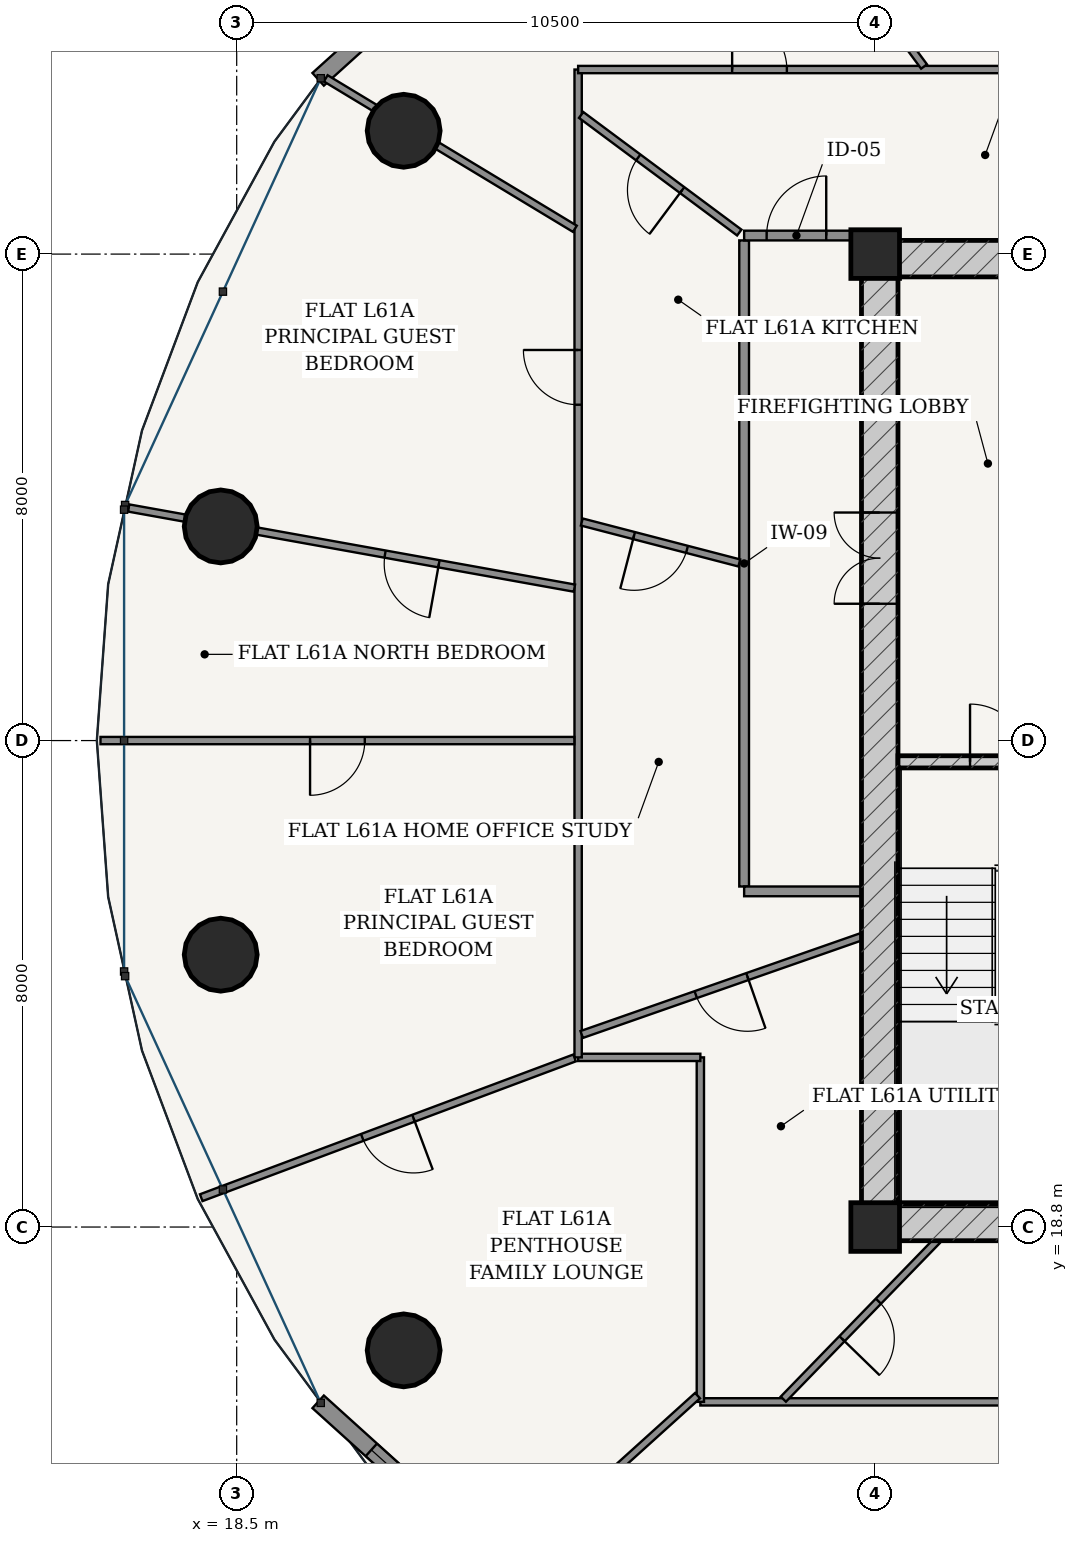
"""IFC4 building model, lengths in metres.
Left out: names, types, materials, properties, quantities, classifications, styles, units other than length and angle.
Written with IfcOpenShell. Run it as: python <this file> out.ifc"""

import sys

from ifc_helpers import new_model, si_unit, direction, frame, frame_2d, origin, origin_2d, place, context, subcontext, project, spatial, rectangle, hollow_circle, extrude, source, transform, mapped, element, fill, save


model = new_model("IFC4")
c1 = context("Model", 3, precision=1e-05, world=origin(), true_north=direction((-0.2419218956, 0.970295726276)))
c2 = subcontext(c1, "Body", "Model", "MODEL_VIEW")
j1 = project(units=[si_unit("LENGTHUNIT", "METRE"), si_unit("PLANEANGLEUNIT", "RADIAN")], contexts=[c1])
p1 = place(None, origin())
s1 = spatial("IfcSite", under=j1, at=p1, CompositionType="ELEMENT")
p2 = place(p1, origin())
s2 = spatial("IfcBuilding", under=s1, at=p2, CompositionType="ELEMENT")
p3 = place(p2, frame((0.0, 0.0, 231.9)))
s3 = spatial("IfcBuildingStorey", under=s2, at=p3, CompositionType="ELEMENT", Elevation=231.9)
for number, where, z_axis, x_axis in (
    (1, (29.0, 18.8, 0.0), (0.0, 0.0, 1.0), (1.0, 0.0, 0.0)),
    (2, (29.0, 34.8, 0.0), (0.0, 0.0, 1.0), (1.0, 0.0, 0.0)),
):
    element("IfcColumn", number, at=place(p3, frame(where, z_axis=z_axis, x_axis=x_axis)), inside=s3, PredefinedType="COLUMN", context=c2, shape_type="SweptSolid", body=[
        extrude(rectangle(XDim=0.8, YDim=0.8, at=origin_2d()), origin(), (0.0, 0.0, 1.0), 3.7),
    ])
p4 = place(p3, frame((28.775, 18.875, 0.0), z_axis=(0.0, 0.0, 1.0), x_axis=(1.0, 0.0, 0.0)))
e3 = element("IfcWall", 3, at=p4, inside=s3, PredefinedType="SHEAR", context=c2, shape_type="SweptSolid", body=[
    extrude(rectangle(XDim=18.45, YDim=0.6, at=frame_2d((9.225, 0.0))), origin(), (0.0, 0.0, 1.0), 3.435),
])
p5 = place(p4, frame((8.8, 0.0, 0.0)))
e4 = element("IfcOpeningElement", 4, at=p5, cuts=e3, PredefinedType="OPENING", context=c2, shape_type="SweptSolid", body=[
    extrude(rectangle(XDim=0.85, YDim=2.1, at=frame_2d((0.425, 1.05))), frame((0.0, 0.31, 0.0), z_axis=(0.0, -1.0, 0.0), x_axis=(1.0, 0.0, 0.0)), (0.0, 0.0, 1.0), 0.62),
])
p6 = place(p3, frame((28.775, 34.725, 0.0), z_axis=(0.0, 0.0, 1.0), x_axis=(1.0, 0.0, 0.0)))
e5 = element("IfcWall", 5, at=p6, inside=s3, PredefinedType="SHEAR", context=c2, shape_type="SweptSolid", body=[
    extrude(rectangle(XDim=18.45, YDim=0.6, at=frame_2d((9.225, 0.0))), origin(), (0.0, 0.0, 1.0), 3.435),
])
p7 = place(p3, frame((29.075, 19.175, 0.0), z_axis=(0.0, 0.0, 1.0), x_axis=(0.0, 1.0, 0.0)))
e6 = element("IfcWall", 6, at=p7, inside=s3, PredefinedType="SHEAR", context=c2, shape_type="SweptSolid", body=[
    extrude(rectangle(XDim=15.25, YDim=0.6, at=frame_2d((7.625, 0.0))), origin(), (0.0, 0.0, 1.0), 3.435),
])
p8 = place(p7, frame((9.875, 0.0, 0.0)))
e7 = element("IfcOpeningElement", 7, at=p8, cuts=e6, PredefinedType="OPENING", context=c2, shape_type="SweptSolid", body=[
    extrude(rectangle(XDim=1.5, YDim=2.2, at=frame_2d((0.75, 1.1))), frame((0.0, 0.31, 0.0), z_axis=(0.0, -1.0, 0.0), x_axis=(1.0, 0.0, 0.0)), (0.0, 0.0, 1.0), 0.62),
])
p9 = place(p3, frame((29.375, 26.45, 0.0), z_axis=(0.0, 0.0, 1.0), x_axis=(1.0, 0.0, 0.0)))
e8 = element("IfcWall", 8, at=p9, inside=s3, PredefinedType="SOLIDWALL", context=c2, shape_type="SweptSolid", body=[
    extrude(rectangle(XDim=3.32, YDim=0.2, at=frame_2d((1.66, 0.0))), origin(), (0.0, 0.0, 1.0), 3.435),
])
p10 = place(p9, frame((1.185, 0.0, 0.0)))
e9 = element("IfcOpeningElement", 9, at=p10, cuts=e8, PredefinedType="OPENING", context=c2, shape_type="SweptSolid", body=[
    extrude(rectangle(XDim=0.95, YDim=2.15, at=frame_2d((0.475, 1.075))), frame((0.0, 0.11, 0.0), z_axis=(0.0, -1.0, 0.0), x_axis=(1.0, 0.0, 0.0)), (0.0, 0.0, 1.0), 0.22),
])
for number, where, z_axis, x_axis in (
    (10, (21.246, 36.828, 0.0), (0.0, 0.0, 1.0), (1.0, 0.0, 0.0)),
    (11, (18.237, 30.321, 0.0), (0.0, 0.0, 1.0), (1.0, 0.0, 0.0)),
    (12, (18.237, 23.279, 0.0), (0.0, 0.0, 1.0), (1.0, 0.0, 0.0)),
    (13, (21.246, 16.772, 0.0), (0.0, 0.0, 1.0), (1.0, 0.0, 0.0)),
):
    element("IfcColumn", number, at=place(p3, frame(where, z_axis=z_axis, x_axis=x_axis)), inside=s3, PredefinedType="COLUMN", context=c2, shape_type="SweptSolid", body=[
        extrude(hollow_circle(Radius=0.6, WallThickness=0.038, at=origin_2d()), origin(), (0.0, 0.0, 1.0), 3.7),
    ])
p11 = place(p3, frame((25.965, 43.209, 0.0), z_axis=(0.0, 0.0, 1.0), x_axis=(-0.741972126783, -0.670430729514, 0.0)))
e14 = element("IfcWall", 14, at=p11, inside=s3, PredefinedType="SOLIDWALL", context=c2, shape_type="SweptSolid", body=[
    extrude(rectangle(XDim=8.255, YDim=0.28, at=frame_2d((4.127, 0.0))), origin(), (0.0, 0.0, 1.0), 3.435),
])
p12 = place(p11, frame((1.179, 0.0, 0.85)))
e15 = element("IfcOpeningElement", 15, at=p12, cuts=e14, PredefinedType="OPENING", context=c2, shape_type="SweptSolid", body=[
    extrude(rectangle(XDim=2.1, YDim=1.95, at=frame_2d((1.05, 0.975))), frame((0.0, 0.15, 0.0), z_axis=(0.0, -1.0, 0.0), x_axis=(1.0, 0.0, 0.0)), (0.0, 0.0, 1.0), 0.3),
])
p13 = place(p11, frame((4.976, 0.0, 0.85)))
e16 = element("IfcOpeningElement", 16, at=p13, cuts=e14, PredefinedType="OPENING", context=c2, shape_type="SweptSolid", body=[
    extrude(rectangle(XDim=2.1, YDim=1.95, at=frame_2d((1.05, 0.975))), frame((0.0, 0.15, 0.0), z_axis=(0.0, -1.0, 0.0), x_axis=(1.0, 0.0, 0.0)), (0.0, 0.0, 1.0), 0.3),
])
p14 = place(p3, frame((19.84, 15.926, 0.0), z_axis=(0.0, 0.0, 1.0), x_axis=(0.741986838603, -0.670414447443, 0.0)))
e17 = element("IfcWall", 17, at=p14, inside=s3, PredefinedType="SOLIDWALL", context=c2, shape_type="SweptSolid", body=[
    extrude(rectangle(XDim=8.255, YDim=0.28, at=frame_2d((4.127, 0.0))), origin(), (0.0, 0.0, 1.0), 3.435),
])
p15 = place(p14, frame((1.179, 0.0, 0.85)))
e18 = element("IfcOpeningElement", 18, at=p15, cuts=e17, PredefinedType="OPENING", context=c2, shape_type="SweptSolid", body=[
    extrude(rectangle(XDim=2.1, YDim=1.95, at=frame_2d((1.05, 0.975))), frame((0.0, 0.15, 0.0), z_axis=(0.0, -1.0, 0.0), x_axis=(1.0, 0.0, 0.0)), (0.0, 0.0, 1.0), 0.3),
])
p16 = place(p14, frame((4.976, 0.0, 0.85)))
e19 = element("IfcOpeningElement", 19, at=p16, cuts=e17, PredefinedType="OPENING", context=c2, shape_type="SweptSolid", body=[
    extrude(rectangle(XDim=2.1, YDim=1.95, at=frame_2d((1.05, 0.975))), frame((0.0, 0.15, 0.0), z_axis=(0.0, -1.0, 0.0), x_axis=(1.0, 0.0, 0.0)), (0.0, 0.0, 1.0), 0.3),
])
p17 = place(p3, frame((26.845, 24.4, 0.0), z_axis=(0.0, 0.0, 1.0), x_axis=(0.0, 1.0, 0.0)))
e20 = element("IfcWall", 20, at=p17, inside=s3, PredefinedType="PARTITIONING", context=c2, shape_type="SweptSolid", body=[
    extrude(rectangle(XDim=10.625, YDim=0.16, at=frame_2d((5.312, 0.0))), origin(), (0.0, 0.0, 1.0), 2.951),
])
p18 = place(p3, frame((26.845, 35.105, 0.0), z_axis=(0.0, 0.0, 1.0), x_axis=(1.0, 0.0, 0.0)))
e21 = element("IfcWall", 21, at=p18, inside=s3, PredefinedType="PARTITIONING", context=c2, shape_type="SweptSolid", body=[
    extrude(rectangle(XDim=1.93, YDim=0.16, at=frame_2d((0.965, 0.0))), origin(), (0.0, 0.0, 1.0), 3.435),
])
p19 = place(p18, frame((0.37, 0.0, 0.0)))
e22 = element("IfcOpeningElement", 22, at=p19, cuts=e21, PredefinedType="OPENING", context=c2, shape_type="SweptSolid", body=[
    extrude(rectangle(XDim=0.98, YDim=2.2, at=frame_2d((0.49, 1.1))), frame((0.0, 0.09, 0.0), z_axis=(0.0, -1.0, 0.0), x_axis=(1.0, 0.0, 0.0)), (0.0, 0.0, 1.0), 0.18),
])
p20 = place(p3, frame((26.845, 24.32, 0.0), z_axis=(0.0, 0.0, 1.0), x_axis=(1.0, 0.0, 0.0)))
e23 = element("IfcWall", 23, at=p20, inside=s3, PredefinedType="PARTITIONING", context=c2, shape_type="SweptSolid", body=[
    extrude(rectangle(XDim=1.93, YDim=0.16, at=frame_2d((0.965, 0.0))), origin(), (0.0, 0.0, 1.0), 3.435),
])
p21 = place(p3, frame((31.59, 15.925, 0.0), z_axis=(0.0, 0.0, 1.0), x_axis=(-1.0, 0.0, 0.0)))
e24 = element("IfcWall", 24, at=p21, inside=s3, PredefinedType="PARTITIONING", context=c2, shape_type="SweptSolid", body=[
    extrude(rectangle(XDim=5.465, YDim=0.12, at=frame_2d((2.732, 0.0))), origin(), (0.0, 0.0, 1.0), 2.951),
])
p22 = place(p3, frame((26.125, 15.925, 0.0), z_axis=(0.0, 0.0, 1.0), x_axis=(0.0, 1.0, 0.0)))
e25 = element("IfcWall", 25, at=p22, inside=s3, PredefinedType="PARTITIONING", context=c2, shape_type="SweptSolid", body=[
    extrude(rectangle(XDim=5.665, YDim=0.12, at=frame_2d((2.833, 0.0))), origin(), (0.0, 0.0, 1.0), 2.951),
])
p23 = place(p3, frame((26.125, 21.59, 0.0), z_axis=(0.0, 0.0, 1.0), x_axis=(-1.0, 0.0, 0.0)))
e26 = element("IfcWall", 26, at=p23, inside=s3, PredefinedType="PARTITIONING", context=c2, shape_type="SweptSolid", body=[
    extrude(rectangle(XDim=2.01, YDim=0.12, at=frame_2d((1.005, 0.0))), origin(), (0.0, 0.0, 1.0), 3.11),
])
p24 = place(p3, frame((24.115, 21.59, 0.0), z_axis=(0.0, 0.0, 1.0), x_axis=(0.0, 1.0, 0.0)))
e27 = element("IfcWall", 27, at=p24, inside=s3, PredefinedType="PARTITIONING", context=c2, shape_type="SweptSolid", body=[
    extrude(rectangle(XDim=16.245, YDim=0.12, at=frame_2d((8.123, 0.0))), origin(), (0.0, 0.0, 1.0), 2.951),
])
p25 = place(p24, frame((10.733, 0.0, 0.0)))
e28 = element("IfcOpeningElement", 28, at=p25, cuts=e27, PredefinedType="OPENING", context=c2, shape_type="SweptSolid", body=[
    extrude(rectangle(XDim=0.9, YDim=2.15, at=frame_2d((0.45, 1.075))), frame((0.0, 0.07, 0.0), z_axis=(0.0, -1.0, 0.0), x_axis=(1.0, 0.0, 0.0)), (0.0, 0.0, 1.0), 0.14),
])
p26 = place(p3, frame((24.115, 37.835, 0.0), z_axis=(0.0, 0.0, 1.0), x_axis=(1.0, 0.0, 0.0)))
e29 = element("IfcWall", 29, at=p26, inside=s3, PredefinedType="PARTITIONING", context=c2, shape_type="SweptSolid", body=[
    extrude(rectangle(XDim=7.47, YDim=0.12, at=frame_2d((3.735, 0.0))), origin(), (0.0, 0.0, 1.0), 2.951),
])
p27 = place(p26, frame((2.533, 0.0, 0.0)))
e30 = element("IfcOpeningElement", 30, at=p27, cuts=e29, PredefinedType="OPENING", context=c2, shape_type="SweptSolid", body=[
    extrude(rectangle(XDim=0.9, YDim=2.15, at=frame_2d((0.45, 1.075))), frame((0.0, 0.07, 0.0), z_axis=(0.0, -1.0, 0.0), x_axis=(1.0, 0.0, 0.0)), (0.0, 0.0, 1.0), 0.14),
])
p28 = place(p3, frame((29.804, 37.885, 0.0), z_axis=(0.0, 0.0, 1.0), x_axis=(-0.594507557292, 0.804090022524, 0.0)))
e31 = element("IfcWall", 31, at=p28, inside=s3, PredefinedType="PARTITIONING", context=c2, shape_type="SweptSolid", body=[
    extrude(rectangle(XDim=6.481, YDim=0.12, at=frame_2d((3.241, 0.0))), origin(), (0.0, 0.0, 1.0), 2.951),
])
p29 = place(p3, frame((24.062, 35.216, 0.0), z_axis=(0.0, 0.0, 1.0), x_axis=(-0.856058483833, 0.516878972543, 0.0)))
e32 = element("IfcWall", 32, at=p29, inside=s3, PredefinedType="PARTITIONING", context=c2, shape_type="SweptSolid", body=[
    extrude(rectangle(XDim=4.787, YDim=0.12, at=frame_2d((2.393, 0.0))), origin(), (0.0, 0.0, 1.0), 2.951),
])
p30 = place(p3, frame((24.054, 29.307, 0.0), z_axis=(0.0, 0.0, 1.0), x_axis=(-0.984227185588, 0.176909149424, 0.0)))
e33 = element("IfcWall", 33, at=p30, inside=s3, PredefinedType="PARTITIONING", context=c2, shape_type="SweptSolid", body=[
    extrude(rectangle(XDim=7.448, YDim=0.12, at=frame_2d((3.724, 0.0))), origin(), (0.0, 0.0, 1.0), 2.951),
])
p31 = place(p30, frame((2.264, 0.0, 0.0)))
e34 = element("IfcOpeningElement", 34, at=p31, cuts=e33, PredefinedType="OPENING", context=c2, shape_type="SweptSolid", body=[
    extrude(rectangle(XDim=0.9, YDim=2.15, at=frame_2d((0.45, 1.075))), frame((0.0, 0.07, 0.0), z_axis=(0.0, -1.0, 0.0), x_axis=(1.0, 0.0, 0.0)), (0.0, 0.0, 1.0), 0.14),
])
p32 = place(p3, frame((24.053, 26.8, 0.0), z_axis=(0.0, 0.0, 1.0), x_axis=(-1.0, 0.0, 0.0)))
e35 = element("IfcWall", 35, at=p32, inside=s3, PredefinedType="PARTITIONING", context=c2, shape_type="SweptSolid", body=[
    extrude(rectangle(XDim=7.793, YDim=0.12, at=frame_2d((3.896, 0.0))), origin(), (0.0, 0.0, 1.0), 2.951),
])
p33 = place(p32, frame((3.447, 0.0, 0.0)))
e36 = element("IfcOpeningElement", 36, at=p33, cuts=e35, PredefinedType="OPENING", context=c2, shape_type="SweptSolid", body=[
    extrude(rectangle(XDim=0.9, YDim=2.15, at=frame_2d((0.45, 1.075))), frame((0.0, 0.07, 0.0), z_axis=(0.0, -1.0, 0.0), x_axis=(1.0, 0.0, 0.0)), (0.0, 0.0, 1.0), 0.14),
])
p34 = place(p3, frame((24.057, 21.581, 0.0), z_axis=(0.0, 0.0, 1.0), x_axis=(-0.936527968377, -0.350592875637, 0.0)))
e37 = element("IfcWall", 37, at=p34, inside=s3, PredefinedType="PARTITIONING", context=c2, shape_type="SweptSolid", body=[
    extrude(rectangle(XDim=6.556, YDim=0.12, at=frame_2d((3.278, 0.0))), origin(), (0.0, 0.0, 1.0), 2.951),
])
p35 = place(p34, frame((2.828, 0.0, 0.0)))
e38 = element("IfcOpeningElement", 38, at=p35, cuts=e37, PredefinedType="OPENING", context=c2, shape_type="SweptSolid", body=[
    extrude(rectangle(XDim=0.9, YDim=2.15, at=frame_2d((0.45, 1.075))), frame((0.0, 0.07, 0.0), z_axis=(0.0, -1.0, 0.0), x_axis=(1.0, 0.0, 0.0)), (0.0, 0.0, 1.0), 0.14),
])
p36 = place(p3, frame((26.079, 16.027, 0.0), z_axis=(0.0, 0.0, 1.0), x_axis=(-0.741950057395, -0.67045515311, 0.0)))
e39 = element("IfcWall", 39, at=p36, inside=s3, PredefinedType="PARTITIONING", context=c2, shape_type="SweptSolid", body=[
    extrude(rectangle(XDim=4.647, YDim=0.12, at=frame_2d((2.324, 0.0))), origin(), (0.0, 0.0, 1.0), 2.951),
])
p37 = place(p36, frame((1.874, 0.0, 0.0)))
e40 = element("IfcOpeningElement", 40, at=p37, cuts=e39, PredefinedType="OPENING", context=c2, shape_type="SweptSolid", body=[
    extrude(rectangle(XDim=0.9, YDim=2.15, at=frame_2d((0.45, 1.075))), frame((0.0, 0.07, 0.0), z_axis=(0.0, -1.0, 0.0), x_axis=(1.0, 0.0, 0.0)), (0.0, 0.0, 1.0), 0.14),
])
p38 = place(p3, frame((26.765, 35.154, 0.0), z_axis=(0.0, 0.0, 1.0), x_axis=(-0.802434587752, 0.596740087793, 0.0)))
e41 = element("IfcWall", 41, at=p38, inside=s3, PredefinedType="PARTITIONING", context=c2, shape_type="SweptSolid", body=[
    extrude(rectangle(XDim=3.24, YDim=0.12, at=frame_2d((1.62, 0.0))), origin(), (0.0, 0.0, 1.0), 3.11),
])
p39 = place(p38, frame((1.17, 0.0, 0.0)))
e42 = element("IfcOpeningElement", 42, at=p39, cuts=e41, PredefinedType="OPENING", context=c2, shape_type="SweptSolid", body=[
    extrude(rectangle(XDim=0.9, YDim=2.15, at=frame_2d((0.45, 1.075))), frame((0.0, 0.07, 0.0), z_axis=(0.0, -1.0, 0.0), x_axis=(1.0, 0.0, 0.0)), (0.0, 0.0, 1.0), 0.14),
])
p40 = place(p3, frame((26.765, 29.721, 0.0), z_axis=(0.0, 0.0, 1.0), x_axis=(-0.967824284298, 0.251627015092, 0.0)))
e43 = element("IfcWall", 43, at=p40, inside=s3, PredefinedType="PARTITIONING", context=c2, shape_type="SweptSolid", body=[
    extrude(rectangle(XDim=2.676, YDim=0.12, at=frame_2d((1.338, 0.0))), origin(), (0.0, 0.0, 1.0), 3.435),
])
p41 = place(p40, frame((0.888, 0.0, 0.0)))
e44 = element("IfcOpeningElement", 44, at=p41, cuts=e43, PredefinedType="OPENING", context=c2, shape_type="SweptSolid", body=[
    extrude(rectangle(XDim=0.9, YDim=2.15, at=frame_2d((0.45, 1.075))), frame((0.0, 0.07, 0.0), z_axis=(0.0, -1.0, 0.0), x_axis=(1.0, 0.0, 0.0)), (0.0, 0.0, 1.0), 0.14),
])
p42 = place(p3, frame((28.775, 23.575, 0.0), z_axis=(0.0, 0.0, 1.0), x_axis=(-0.943974645063, -0.330017983569, 0.0)))
e45 = element("IfcWall", 45, at=p42, inside=s3, PredefinedType="PARTITIONING", context=c2, shape_type="SweptSolid", body=[
    extrude(rectangle(XDim=4.875, YDim=0.12, at=frame_2d((2.437, 0.0))), origin(), (0.0, 0.0, 1.0), 3.11),
])
p43 = place(p42, frame((1.987, 0.0, 0.0)))
e46 = element("IfcOpeningElement", 46, at=p43, cuts=e45, PredefinedType="OPENING", context=c2, shape_type="SweptSolid", body=[
    extrude(rectangle(XDim=0.9, YDim=2.15, at=frame_2d((0.45, 1.075))), frame((0.0, 0.07, 0.0), z_axis=(0.0, -1.0, 0.0), x_axis=(1.0, 0.0, 0.0)), (0.0, 0.0, 1.0), 0.14),
])
p44 = place(p3, frame((30.018, 18.575, 0.0), z_axis=(0.0, 0.0, 1.0), x_axis=(-0.696436677683, -0.717618250867, 0.0)))
e47 = element("IfcWall", 47, at=p44, inside=s3, PredefinedType="PARTITIONING", context=c2, shape_type="SweptSolid", body=[
    extrude(rectangle(XDim=3.631, YDim=0.12, at=frame_2d((1.815, 0.0))), origin(), (0.0, 0.0, 1.0), 2.951),
])
p45 = place(p44, frame((1.385, 0.0, 0.0)))
e48 = element("IfcOpeningElement", 48, at=p45, cuts=e47, PredefinedType="OPENING", context=c2, shape_type="SweptSolid", body=[
    extrude(rectangle(XDim=0.86, YDim=2.15, at=frame_2d((0.43, 1.075))), frame((0.0, 0.07, 0.0), z_axis=(0.0, -1.0, 0.0), x_axis=(1.0, 0.0, 0.0)), (0.0, 0.0, 1.0), 0.14),
])
m1 = source(origin(), c2, "Body", "SweptSolid", [
    extrude(rectangle(XDim=2.1, YDim=1.95, at=frame_2d((1.05, 0.975))), frame((0.0, 0.03, 0.0), z_axis=(0.0, -1.0, 0.0), x_axis=(1.0, 0.0, 0.0)), (0.0, 0.0, 1.0), 0.06),
])
p46 = place(p15, origin())
e49 = element("IfcWindow", 49, at=p46, inside=s3, PartitioningType="SINGLE_PANEL", PredefinedType="WINDOW", context=c2, shape_type="MappedRepresentation", body=[
    mapped(m1, transform((0.0, 0.0, 0.0), scale=1.0)),
])
fill(e18, e49)
m2 = source(origin(), c2, "Body", "SweptSolid", [
    extrude(rectangle(XDim=1.5, YDim=2.2, at=frame_2d((0.75, 1.1))), frame((0.0, 0.025, 0.0), z_axis=(0.0, -1.0, 0.0), x_axis=(1.0, 0.0, 0.0)), (0.0, 0.0, 1.0), 0.05),
])
p47 = place(p8, origin())
e50 = element("IfcDoor", 50, at=p47, inside=s3, OperationType="DOUBLE_DOOR_SINGLE_SWING", PredefinedType="DOOR", context=c2, shape_type="MappedRepresentation", body=[
    mapped(m2, transform((0.0, 0.0, 0.0), scale=1.0)),
])
fill(e7, e50)
m3 = source(origin(), c2, "Body", "SweptSolid", [
    extrude(rectangle(XDim=0.95, YDim=2.15, at=frame_2d((0.475, 1.075))), frame((0.0, 0.025, 0.0), z_axis=(0.0, -1.0, 0.0), x_axis=(1.0, 0.0, 0.0)), (0.0, 0.0, 1.0), 0.05),
])
p48 = place(p10, origin())
e51 = element("IfcDoor", 51, at=p48, inside=s3, OperationType="SINGLE_SWING_LEFT", PredefinedType="DOOR", context=c2, shape_type="MappedRepresentation", body=[
    mapped(m3, transform((0.0, 0.0, 0.0), scale=1.0)),
])
fill(e9, e51)
m4 = source(origin(), c2, "Body", "SweptSolid", [
    extrude(rectangle(XDim=0.98, YDim=2.2, at=frame_2d((0.49, 1.1))), frame((0.0, 0.025, 0.0), z_axis=(0.0, -1.0, 0.0), x_axis=(1.0, 0.0, 0.0)), (0.0, 0.0, 1.0), 0.05),
])
p49 = place(p19, origin())
e52 = element("IfcDoor", 52, at=p49, inside=s3, OperationType="SINGLE_SWING_RIGHT", PredefinedType="DOOR", context=c2, shape_type="MappedRepresentation", body=[
    mapped(m4, transform((0.0, 0.0, 0.0), scale=1.0)),
])
fill(e22, e52)
m5 = source(origin(), c2, "Body", "SweptSolid", [
    extrude(rectangle(XDim=0.9, YDim=2.15, at=frame_2d((0.45, 1.075))), frame((0.0, 0.025, 0.0), z_axis=(0.0, -1.0, 0.0), x_axis=(1.0, 0.0, 0.0)), (0.0, 0.0, 1.0), 0.05),
])
p50 = place(p39, origin())
e53 = element("IfcDoor", 53, at=p50, inside=s3, OperationType="SINGLE_SWING_LEFT", PredefinedType="DOOR", context=c2, shape_type="MappedRepresentation", body=[
    mapped(m5, transform((0.0, 0.0, 0.0), scale=1.0)),
])
fill(e42, e53)
p51 = place(p41, origin())
e54 = element("IfcDoor", 54, at=p51, inside=s3, OperationType="SINGLE_SWING_RIGHT", PredefinedType="DOOR", context=c2, shape_type="MappedRepresentation", body=[
    mapped(m5, transform((0.0, 0.0, 0.0), scale=1.0)),
])
fill(e44, e54)
p52 = place(p43, origin())
e55 = element("IfcDoor", 55, at=p52, inside=s3, OperationType="SINGLE_SWING_LEFT", PredefinedType="DOOR", context=c2, shape_type="MappedRepresentation", body=[
    mapped(m5, transform((0.0, 0.0, 0.0), scale=1.0)),
])
fill(e46, e55)
m6 = source(origin(), c2, "Body", "SweptSolid", [
    extrude(rectangle(XDim=0.86, YDim=2.15, at=frame_2d((0.43, 1.075))), frame((0.0, 0.025, 0.0), z_axis=(0.0, -1.0, 0.0), x_axis=(1.0, 0.0, 0.0)), (0.0, 0.0, 1.0), 0.05),
])
p53 = place(p45, origin())
e56 = element("IfcDoor", 56, at=p53, inside=s3, OperationType="SINGLE_SWING_RIGHT", PredefinedType="DOOR", context=c2, shape_type="MappedRepresentation", body=[
    mapped(m6, transform((0.0, 0.0, 0.0), scale=1.0)),
])
fill(e48, e56)
p54 = place(p27, origin())
e57 = element("IfcDoor", 57, at=p54, inside=s3, OperationType="SINGLE_SWING_LEFT", PredefinedType="DOOR", context=c2, shape_type="MappedRepresentation", body=[
    mapped(m5, transform((0.0, 0.0, 0.0), scale=1.0)),
])
fill(e30, e57)
p55 = place(p25, origin())
e58 = element("IfcDoor", 58, at=p55, inside=s3, OperationType="SINGLE_SWING_RIGHT", PredefinedType="DOOR", context=c2, shape_type="MappedRepresentation", body=[
    mapped(m5, transform((0.0, 0.0, 0.0), scale=1.0)),
])
fill(e28, e58)
p56 = place(p31, origin())
e59 = element("IfcDoor", 59, at=p56, inside=s3, OperationType="SINGLE_SWING_LEFT", PredefinedType="DOOR", context=c2, shape_type="MappedRepresentation", body=[
    mapped(m5, transform((0.0, 0.0, 0.0), scale=1.0)),
])
fill(e34, e59)
p57 = place(p33, origin())
e60 = element("IfcDoor", 60, at=p57, inside=s3, OperationType="SINGLE_SWING_RIGHT", PredefinedType="DOOR", context=c2, shape_type="MappedRepresentation", body=[
    mapped(m5, transform((0.0, 0.0, 0.0), scale=1.0)),
])
fill(e36, e60)
p58 = place(p35, origin())
e61 = element("IfcDoor", 61, at=p58, inside=s3, OperationType="SINGLE_SWING_LEFT", PredefinedType="DOOR", context=c2, shape_type="MappedRepresentation", body=[
    mapped(m5, transform((0.0, 0.0, 0.0), scale=1.0)),
])
fill(e38, e61)
save(model, sys.argv[1])
